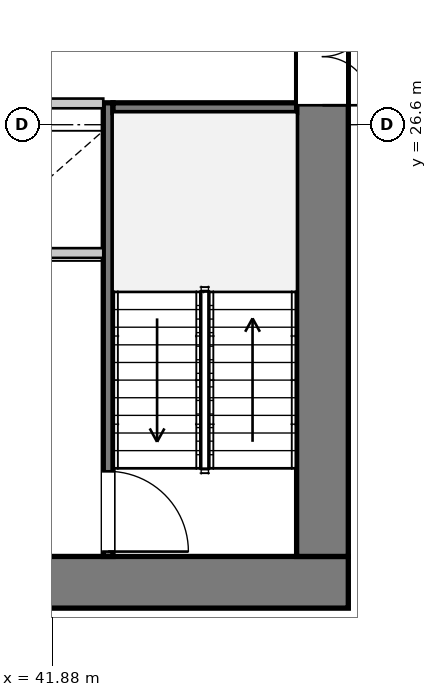
"""IFC4 building model, lengths in metres.
Left out: names, types, materials, properties, quantities, classifications, styles, units other than length and angle.
Written with IfcOpenShell. Run it as: python <this file> out.ifc"""

import sys

from ifc_helpers import new_model, si_unit, direction, frame, frame_2d, origin, place, context, subcontext, project, spatial, rectangle, extrude, source, transform, mapped, element, fill, save


model = new_model("IFC4")
c1 = context("Model", 3, precision=1e-05, world=origin(), true_north=direction((0.0, 1.0)))
c2 = subcontext(c1, "Body", "Model", "MODEL_VIEW")
j1 = project(units=[si_unit("LENGTHUNIT", "METRE"), si_unit("PLANEANGLEUNIT", "RADIAN")], contexts=[c1])
p1 = place(None, origin())
s1 = spatial("IfcSite", under=j1, at=p1, CompositionType="ELEMENT")
p2 = place(p1, origin())
s2 = spatial("IfcBuilding", under=s1, at=p2, CompositionType="ELEMENT")
p3 = place(p2, frame((0.0, 0.0, 61.25)))
s3 = spatial("IfcBuildingStorey", under=s2, at=p3, CompositionType="ELEMENT", Elevation=61.25)
p4 = place(p3, frame((46.75, 19.075, 0.0), z_axis=(0.0, 0.0, 1.0), x_axis=(-1.0, 0.0, 0.0)))
e1 = element("IfcWall", 1, at=p4, inside=s3, PredefinedType="SHEAR", context=c2, shape_type="SweptSolid", body=[
    extrude(rectangle(XDim=17.5, YDim=0.85, at=frame_2d((8.75, 0.0))), origin(), (0.0, 0.0, 1.0), 3.3),
])
p5 = place(p4, frame((4.95, 0.0, 0.0)))
e2 = element("IfcOpeningElement", 2, at=p5, cuts=e1, PredefinedType="OPENING", context=c2, shape_type="SweptSolid", body=[
    extrude(rectangle(XDim=1.12, YDim=2.25, at=frame_2d((0.56, 1.125))), frame((0.0, 0.435, 0.0), z_axis=(0.0, -1.0, 0.0), x_axis=(1.0, 0.0, 0.0)), (0.0, 0.0, 1.0), 0.87),
])
p6 = place(p4, frame((11.45, 0.0, 0.0)))
e3 = element("IfcOpeningElement", 3, at=p6, cuts=e1, PredefinedType="OPENING", context=c2, shape_type="SweptSolid", body=[
    extrude(rectangle(XDim=1.12, YDim=2.25, at=frame_2d((0.56, 1.125))), frame((0.0, 0.435, 0.0), z_axis=(0.0, -1.0, 0.0), x_axis=(1.0, 0.0, 0.0)), (0.0, 0.0, 1.0), 0.87),
])
p7 = place(p3, frame((46.325, 33.7, 0.0), z_axis=(0.0, 0.0, 1.0), x_axis=(0.0, -1.0, 0.0)))
e4 = element("IfcWall", 4, at=p7, inside=s3, PredefinedType="SHEAR", context=c2, shape_type="SweptSolid", body=[
    extrude(rectangle(XDim=14.2, YDim=0.85, at=frame_2d((7.1, 0.0))), origin(), (0.0, 0.0, 1.0), 3.3),
])
p8 = place(p7, frame((5.18, 0.0, 0.0)))
e5 = element("IfcOpeningElement", 5, at=p8, cuts=e4, PredefinedType="OPENING", context=c2, shape_type="SweptSolid", body=[
    extrude(rectangle(XDim=1.6, YDim=2.2, at=frame_2d((0.8, 1.1))), frame((0.0, 0.435, 0.0), z_axis=(0.0, -1.0, 0.0), x_axis=(1.0, 0.0, 0.0)), (0.0, 0.0, 1.0), 0.87),
])
p9 = place(p3, frame((42.8, 26.96, 0.0), z_axis=(0.0, 0.0, 1.0), x_axis=(0.0, -1.0, 0.0)))
e6 = element("IfcWall", 6, at=p9, inside=s3, PredefinedType="PARTITIONING", context=c2, shape_type="SweptSolid", body=[
    extrude(rectangle(XDim=7.46, YDim=0.16, at=frame_2d((3.73, 0.0))), origin(), (0.0, 0.0, 1.0), 3.3),
])
p10 = place(p9, frame((6.06, 0.0, 0.0)))
e7 = element("IfcOpeningElement", 7, at=p10, cuts=e6, PredefinedType="OPENING", context=c2, shape_type="SweptSolid", body=[
    extrude(rectangle(XDim=1.32, YDim=2.2, at=frame_2d((0.66, 1.1))), frame((0.0, 0.09, 0.0), z_axis=(0.0, -1.0, 0.0), x_axis=(1.0, 0.0, 0.0)), (0.0, 0.0, 1.0), 0.18),
])
p11 = place(p3, frame((42.88, 26.88, 0.0), z_axis=(0.0, 0.0, 1.0), x_axis=(1.0, 0.0, 0.0)))
e8 = element("IfcWall", 8, at=p11, inside=s3, PredefinedType="PARTITIONING", context=c2, shape_type="SweptSolid", body=[
    extrude(rectangle(XDim=3.02, YDim=0.16, at=frame_2d((1.51, 0.0))), origin(), (0.0, 0.0, 1.0), 3.3),
])
p12 = place(p3, frame((33.28, 24.49, 0.0), z_axis=(0.0, 0.0, 1.0), x_axis=(1.0, 0.0, 0.0)))
e9 = element("IfcWall", 9, at=p12, inside=s3, PredefinedType="PARTITIONING", context=c2, shape_type="SweptSolid", body=[
    extrude(rectangle(XDim=9.44, YDim=0.16, at=frame_2d((4.72, 0.0))), origin(), (0.0, 0.0, 1.0), 3.3),
])
p13 = place(p3, frame((33.28, 26.95, 0.0), z_axis=(0.0, 0.0, 1.0), x_axis=(1.0, 0.0, 0.0)))
e10 = element("IfcWall", 10, at=p13, inside=s3, PredefinedType="PARTITIONING", context=c2, shape_type="SweptSolid", body=[
    extrude(rectangle(XDim=9.44, YDim=0.16, at=frame_2d((4.72, 0.0))), origin(), (0.0, 0.0, 1.0), 3.3),
])
p14 = place(p13, frame((0.26, 0.0, 0.0)))
e11 = element("IfcOpeningElement", 11, at=p14, cuts=e10, PredefinedType="OPENING", context=c2, shape_type="SweptSolid", body=[
    extrude(rectangle(XDim=1.1, YDim=2.2, at=frame_2d((0.55, 1.1))), frame((0.0, 0.09, 0.0), z_axis=(0.0, -1.0, 0.0), x_axis=(1.0, 0.0, 0.0)), (0.0, 0.0, 1.0), 0.18),
])
p15 = place(p13, frame((2.01, 0.0, 0.0)))
e12 = element("IfcOpeningElement", 12, at=p15, cuts=e10, PredefinedType="OPENING", context=c2, shape_type="SweptSolid", body=[
    extrude(rectangle(XDim=1.1, YDim=2.2, at=frame_2d((0.55, 1.1))), frame((0.0, 0.09, 0.0), z_axis=(0.0, -1.0, 0.0), x_axis=(1.0, 0.0, 0.0)), (0.0, 0.0, 1.0), 0.18),
])
p16 = place(p13, frame((3.76, 0.0, 0.0)))
e13 = element("IfcOpeningElement", 13, at=p16, cuts=e10, PredefinedType="OPENING", context=c2, shape_type="SweptSolid", body=[
    extrude(rectangle(XDim=1.1, YDim=2.2, at=frame_2d((0.55, 1.1))), frame((0.0, 0.09, 0.0), z_axis=(0.0, -1.0, 0.0), x_axis=(1.0, 0.0, 0.0)), (0.0, 0.0, 1.0), 0.18),
])
p17 = place(p13, frame((5.51, 0.0, 0.0)))
e14 = element("IfcOpeningElement", 14, at=p17, cuts=e10, PredefinedType="OPENING", context=c2, shape_type="SweptSolid", body=[
    extrude(rectangle(XDim=1.1, YDim=2.2, at=frame_2d((0.55, 1.1))), frame((0.0, 0.09, 0.0), z_axis=(0.0, -1.0, 0.0), x_axis=(1.0, 0.0, 0.0)), (0.0, 0.0, 1.0), 0.18),
])
m1 = source(origin(), c2, "Body", "SweptSolid", [
    extrude(rectangle(XDim=1.6, YDim=2.2, at=frame_2d((0.8, 1.1))), frame((0.0, 0.025, 0.0), z_axis=(0.0, -1.0, 0.0), x_axis=(1.0, 0.0, 0.0)), (0.0, 0.0, 1.0), 0.05),
])
p18 = place(p8, origin())
e15 = element("IfcDoor", 15, at=p18, inside=s3, OperationType="DOUBLE_DOOR_SINGLE_SWING", PredefinedType="DOOR", context=c2, shape_type="MappedRepresentation", body=[
    mapped(m1, transform((0.0, 0.0, 0.0), x_axis=(1.0, 0.0, 0.0), y_axis=(0.0, 1.0, 0.0), z_axis=(0.0, 0.0, 1.0), scale=1.0)),
])
fill(e5, e15)
m2 = source(origin(), c2, "Body", "SweptSolid", [
    extrude(rectangle(XDim=1.32, YDim=2.2, at=frame_2d((0.66, 1.1))), frame((0.0, 0.025, 0.0), z_axis=(0.0, -1.0, 0.0), x_axis=(1.0, 0.0, 0.0)), (0.0, 0.0, 1.0), 0.05),
])
p19 = place(p10, origin())
e16 = element("IfcDoor", 16, at=p19, inside=s3, OperationType="SINGLE_SWING_RIGHT", PredefinedType="DOOR", context=c2, shape_type="MappedRepresentation", body=[
    mapped(m2, transform((0.0, 0.0, 0.0), x_axis=(1.0, 0.0, 0.0), y_axis=(0.0, 1.0, 0.0), z_axis=(0.0, 0.0, 1.0), scale=1.0)),
])
fill(e7, e16)
save(model, sys.argv[1])
